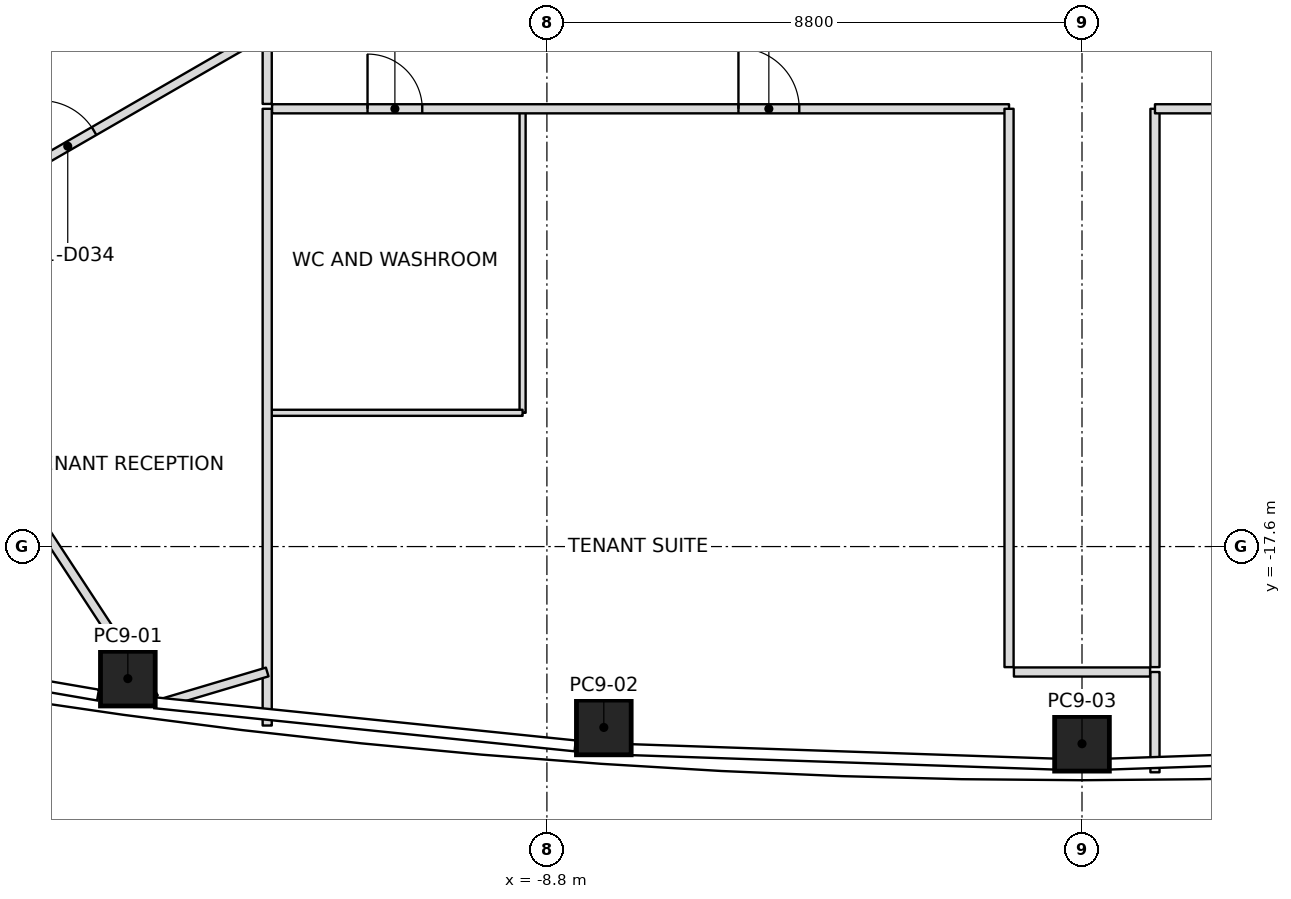
"""IFC4 building model, lengths in metres.
Left out: names, types, materials, properties, quantities, classifications, styles, units other than length and angle.
Written with IfcOpenShell. Run it as: python <this file> out.ifc"""

import sys

from ifc_helpers import new_model, si_unit, direction, frame, frame_2d, origin, origin_2d, place, context, subcontext, project, spatial, rectangle, extrude, element, fill, save


model = new_model("IFC4")
c1 = context("Model", 3, precision=1e-05, world=origin(), true_north=direction((0.0, 1.0)))
c2 = subcontext(c1, "Body", "Model", "MODEL_VIEW")
j1 = project(units=[si_unit("LENGTHUNIT", "METRE"), si_unit("PLANEANGLEUNIT", "RADIAN")], contexts=[c1])
p1 = place(None, origin())
s1 = spatial("IfcSite", under=j1, at=p1, CompositionType="ELEMENT")
p2 = place(p1, origin())
s2 = spatial("IfcBuilding", under=s1, at=p2, CompositionType="ELEMENT")
p3 = place(p2, frame((0.0, 0.0, 231.0)))
s3 = spatial("IfcBuildingStorey", under=s2, at=p3, CompositionType="ELEMENT", Elevation=231.0)
p4 = place(p3, frame((-15.692, -19.772, 0.0), z_axis=(0.017574453011, 0.010434831475, 0.999791104628), x_axis=(-0.990574210989, 0.13604032423, 0.015992582844)))
e1 = element("IfcColumn", 1, at=p4, inside=s3, PredefinedType="COLUMN", context=c2, shape_type="SweptSolid", body=[
    extrude(rectangle(XDim=0.9, YDim=0.9, at=origin_2d()), origin(), (0.0, 0.0, 1.0), 4.001),
])
p5 = place(p3, frame((-7.864, -20.575, 0.0), z_axis=(0.008788174922, 0.01116830563, 0.999899013366), x_axis=(-0.997640525567, 0.068185585075, 0.008006730567)))
e2 = element("IfcColumn", 2, at=p5, inside=s3, PredefinedType="COLUMN", context=c2, shape_type="SweptSolid", body=[
    extrude(rectangle(XDim=0.9, YDim=0.9, at=origin_2d()), origin(), (0.0, 0.0, 1.0), 4.0),
])
p6 = place(p3, frame((0.0, -20.843, 0.0), z_axis=(0.0, 0.011473854038, 0.99993417317), x_axis=(1.0, 0.0, 0.0)))
e3 = element("IfcColumn", 3, at=p6, inside=s3, PredefinedType="COLUMN", context=c2, shape_type="SweptSolid", body=[
    extrude(rectangle(XDim=0.9, YDim=0.9, at=origin_2d()), origin(), (0.0, 0.0, 1.0), 4.0),
])
p7 = place(p3, frame((-19.96, -12.91, 0.0), z_axis=(0.0, 0.0, 1.0), x_axis=(0.547697942309, -0.836676140445, 0.0)))
e4 = element("IfcWall", 4, at=p7, inside=s3, PredefinedType="PARTITIONING", context=c2, shape_type="SweptSolid", body=[
    extrude(rectangle(XDim=8.577, YDim=0.15, at=frame_2d((4.289, 0.0))), origin(), (0.0, 0.0, 1.0), 3.45),
])
p8 = place(p3, frame((-13.4, -10.4, 0.0), z_axis=(0.0, 0.0, 1.0), x_axis=(0.0, -1.0, 0.0)))
e5 = element("IfcWall", 5, at=p8, inside=s3, PredefinedType="PARTITIONING", context=c2, shape_type="SweptSolid", body=[
    extrude(rectangle(XDim=10.144, YDim=0.15, at=frame_2d((5.072, 0.0))), origin(), (0.0, 0.0, 1.0), 3.234),
])
p9 = place(p3, frame((-13.4, -19.663, 0.0), z_axis=(0.0, 0.0, 1.0), x_axis=(-0.958455635455, -0.285241642935, 0.0)))
e6 = element("IfcWall", 6, at=p9, inside=s3, PredefinedType="PARTITIONING", context=c2, shape_type="SweptSolid", body=[
    extrude(rectangle(XDim=1.787, YDim=0.15, at=frame_2d((0.894, 0.0))), origin(), (0.0, 0.0, 1.0), 3.234),
])
p10 = place(p3, frame((1.2, -19.663, 0.0), z_axis=(0.0, 0.0, 1.0), x_axis=(0.0, -1.0, 0.0)))
e7 = element("IfcWall", 7, at=p10, inside=s3, PredefinedType="PARTITIONING", context=c2, shape_type="SweptSolid", body=[
    extrude(rectangle(XDim=1.65, YDim=0.15, at=frame_2d((0.825, 0.0))), origin(), (0.0, 0.0, 1.0), 3.234),
])
p11 = place(p3, frame((-13.4, -6.351, 0.0), z_axis=(0.0, 0.0, 1.0), x_axis=(-0.866028564552, -0.499994525349, 0.0)))
e8 = element("IfcWall", 8, at=p11, inside=s3, PredefinedType="PARTITIONING", context=c2, shape_type="SweptSolid", body=[
    extrude(rectangle(XDim=8.881, YDim=0.15, at=frame_2d((4.44, 0.0))), origin(), (0.0, 0.0, 1.0), 3.317),
])
p12 = place(p11, frame((1.05, 0.0, 0.0)))
e9 = element("IfcOpeningElement", 9, at=p12, cuts=e8, PredefinedType="OPENING", context=c2, shape_type="SweptSolid", body=[
    extrude(rectangle(XDim=0.9, YDim=2.1, at=frame_2d((0.45, 1.05))), frame((0.0, 0.075, 0.0), z_axis=(0.0, -1.0, 0.0), x_axis=(1.0, 0.0, 0.0)), (0.0, 0.0, 1.0), 0.15),
])
p13 = place(p11, frame((5.531, 0.0, 0.0)))
e10 = element("IfcOpeningElement", 10, at=p13, cuts=e8, PredefinedType="OPENING", context=c2, shape_type="SweptSolid", body=[
    extrude(rectangle(XDim=1.0, YDim=2.1, at=frame_2d((0.5, 1.05))), frame((0.0, 0.075, 0.0), z_axis=(0.0, -1.0, 0.0), x_axis=(1.0, 0.0, 0.0)), (0.0, 0.0, 1.0), 0.15),
])
p14 = place(p3, frame((-19.891, -12.87, 0.0), z_axis=(0.0, 0.0, 1.0), x_axis=(0.866019606374, 0.500010041276, 0.0)))
e11 = element("IfcWall", 11, at=p14, inside=s3, PredefinedType="PARTITIONING", context=c2, shape_type="SweptSolid", body=[
    extrude(rectangle(XDim=7.495, YDim=0.15, at=frame_2d((3.748, 0.0))), origin(), (0.0, 0.0, 1.0), 3.233),
])
p15 = place(p14, frame((3.208, 0.0, 0.0)))
e12 = element("IfcOpeningElement", 12, at=p15, cuts=e11, PredefinedType="OPENING", context=c2, shape_type="SweptSolid", body=[
    extrude(rectangle(XDim=1.0, YDim=2.1, at=frame_2d((0.5, 1.05))), frame((0.0, 0.075, 0.0), z_axis=(0.0, -1.0, 0.0), x_axis=(1.0, 0.0, 0.0)), (0.0, 0.0, 1.0), 0.15),
])
p16 = place(p3, frame((-13.4, -9.214, 0.0), z_axis=(0.0, 0.0, 1.0), x_axis=(0.0, -1.0, 0.0)))
e13 = element("IfcWall", 13, at=p16, inside=s3, PredefinedType="PARTITIONING", context=c2, shape_type="SweptSolid", body=[
    extrude(rectangle(XDim=1.106, YDim=0.15, at=frame_2d((0.553, 0.0))), origin(), (0.0, 0.0, 1.0), 3.233),
])
p17 = place(p3, frame((-13.32, -10.4, 0.0), z_axis=(0.0, 0.0, 1.0), x_axis=(1.0, 0.0, 0.0)))
e14 = element("IfcWall", 14, at=p17, inside=s3, PredefinedType="PARTITIONING", context=c2, shape_type="SweptSolid", body=[
    extrude(rectangle(XDim=12.12, YDim=0.15, at=frame_2d((6.06, 0.0))), origin(), (0.0, 0.0, 1.0), 3.317),
])
p18 = place(p17, frame((1.57, 0.0, 0.0)))
e15 = element("IfcOpeningElement", 15, at=p18, cuts=e14, PredefinedType="OPENING", context=c2, shape_type="SweptSolid", body=[
    extrude(rectangle(XDim=0.9, YDim=2.1, at=frame_2d((0.45, 1.05))), frame((0.0, 0.075, 0.0), z_axis=(0.0, -1.0, 0.0), x_axis=(1.0, 0.0, 0.0)), (0.0, 0.0, 1.0), 0.15),
])
p19 = place(p17, frame((7.67, 0.0, 0.0)))
e16 = element("IfcOpeningElement", 16, at=p19, cuts=e14, PredefinedType="OPENING", context=c2, shape_type="SweptSolid", body=[
    extrude(rectangle(XDim=1.0, YDim=2.1, at=frame_2d((0.5, 1.05))), frame((0.0, 0.075, 0.0), z_axis=(0.0, -1.0, 0.0), x_axis=(1.0, 0.0, 0.0)), (0.0, 0.0, 1.0), 0.15),
])
p20 = place(p3, frame((-1.2, -10.4, 0.0), z_axis=(0.0, 0.0, 1.0), x_axis=(0.0, -1.0, 0.0)))
e17 = element("IfcWall", 17, at=p20, inside=s3, PredefinedType="PARTITIONING", context=c2, shape_type="SweptSolid", body=[
    extrude(rectangle(XDim=9.183, YDim=0.15, at=frame_2d((4.592, 0.0))), origin(), (0.0, 0.0, 1.0), 3.45),
])
p21 = place(p3, frame((-1.12, -19.663, 0.0), z_axis=(0.0, 0.0, 1.0), x_axis=(1.0, 0.0, 0.0)))
e18 = element("IfcWall", 18, at=p21, inside=s3, PredefinedType="PARTITIONING", context=c2, shape_type="SweptSolid", body=[
    extrude(rectangle(XDim=2.24, YDim=0.15, at=frame_2d((1.12, 0.0))), origin(), (0.0, 0.0, 1.0), 3.45),
])
p22 = place(p3, frame((1.2, -19.583, 0.0), z_axis=(0.0, 0.0, 1.0), x_axis=(0.0, 1.0, 0.0)))
e19 = element("IfcWall", 19, at=p22, inside=s3, PredefinedType="PARTITIONING", context=c2, shape_type="SweptSolid", body=[
    extrude(rectangle(XDim=9.183, YDim=0.15, at=frame_2d((4.592, 0.0))), origin(), (0.0, 0.0, 1.0), 3.45),
])
p23 = place(p3, frame((1.2, -10.4, 0.0), z_axis=(0.0, 0.0, 1.0), x_axis=(1.0, 0.0, 0.0)))
e20 = element("IfcWall", 20, at=p23, inside=s3, PredefinedType="PARTITIONING", context=c2, shape_type="SweptSolid", body=[
    extrude(rectangle(XDim=12.12, YDim=0.15, at=frame_2d((6.06, 0.0))), origin(), (0.0, 0.0, 1.0), 3.317),
])
p24 = place(p23, frame((5.6, 0.0, 0.0)))
e21 = element("IfcOpeningElement", 21, at=p24, cuts=e20, PredefinedType="OPENING", context=c2, shape_type="SweptSolid", body=[
    extrude(rectangle(XDim=1.0, YDim=2.1, at=frame_2d((0.5, 1.05))), frame((0.0, 0.075, 0.0), z_axis=(0.0, -1.0, 0.0), x_axis=(1.0, 0.0, 0.0)), (0.0, 0.0, 1.0), 0.15),
])
p25 = place(p3, frame((-9.2, -10.43, 0.0), z_axis=(0.0, 0.0, 1.0), x_axis=(0.0, -1.0, 0.0)))
e22 = element("IfcWall", 22, at=p25, inside=s3, PredefinedType="PARTITIONING", context=c2, shape_type="SweptSolid", body=[
    extrude(rectangle(XDim=4.97, YDim=0.1, at=frame_2d((2.485, 0.0))), origin(), (0.0, 0.0, 1.0), 3.45),
])
p26 = place(p3, frame((-9.2, -15.4, 0.0), z_axis=(0.0, 0.0, 1.0), x_axis=(-1.0, 0.0, 0.0)))
e23 = element("IfcWall", 23, at=p26, inside=s3, PredefinedType="PARTITIONING", context=c2, shape_type="SweptSolid", body=[
    extrude(rectangle(XDim=4.17, YDim=0.1, at=frame_2d((2.085, 0.0))), origin(), (0.0, 0.0, 1.0), 3.393),
])
p27 = place(p15, origin())
e24 = element("IfcDoor", 24, at=p27, inside=s3, OperationType="SINGLE_SWING_LEFT", PredefinedType="DOOR", context=c2, shape_type="SweptSolid", body=[
    extrude(rectangle(XDim=1.0, YDim=2.1, at=frame_2d((0.5, 1.05))), frame((0.0, 0.025, 0.0), z_axis=(0.0, -1.0, 0.0), x_axis=(1.0, 0.0, 0.0)), (0.0, 0.0, 1.0), 0.05),
])
fill(e12, e24)
p28 = place(p18, origin())
e25 = element("IfcDoor", 25, at=p28, inside=s3, OperationType="SINGLE_SWING_LEFT", PredefinedType="DOOR", context=c2, shape_type="SweptSolid", body=[
    extrude(rectangle(XDim=0.9, YDim=2.1, at=frame_2d((0.45, 1.05))), frame((0.0, 0.025, 0.0), z_axis=(0.0, -1.0, 0.0), x_axis=(1.0, 0.0, 0.0)), (0.0, 0.0, 1.0), 0.05),
])
fill(e15, e25)
p29 = place(p19, origin())
e26 = element("IfcDoor", 26, at=p29, inside=s3, OperationType="SINGLE_SWING_LEFT", PredefinedType="DOOR", context=c2, shape_type="SweptSolid", body=[
    extrude(rectangle(XDim=1.0, YDim=2.1, at=frame_2d((0.5, 1.05))), frame((0.0, 0.025, 0.0), z_axis=(0.0, -1.0, 0.0), x_axis=(1.0, 0.0, 0.0)), (0.0, 0.0, 1.0), 0.05),
])
fill(e16, e26)
save(model, sys.argv[1])
